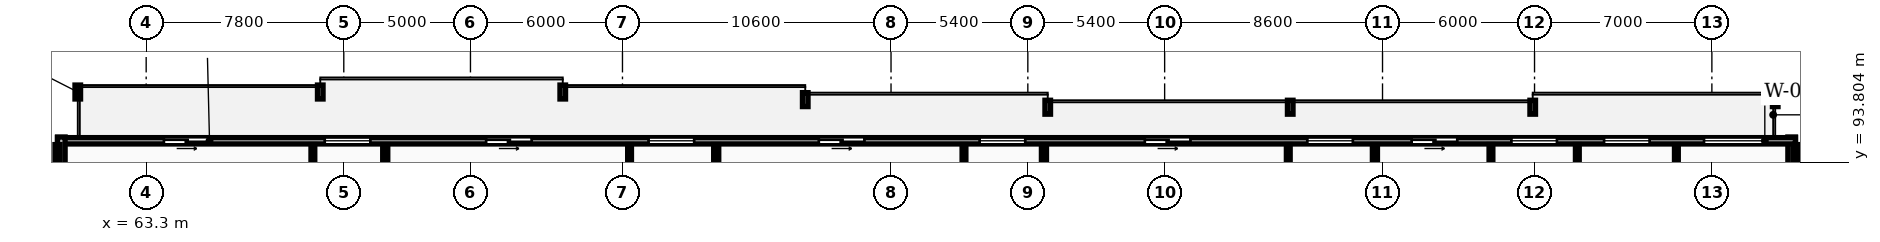
"""IFC4 building model, lengths in metres.
Left out: names, types, materials, properties, quantities, classifications, styles, units other than length and angle.
Written with IfcOpenShell. Run it as: python <this file> out.ifc"""

import sys

from ifc_helpers import new_model, si_unit, direction, frame, frame_2d, origin, place, context, subcontext, project, spatial, rectangle, extrude, element, fill, save


model = new_model("IFC4")
c1 = context("Model", 3, precision=1e-05, world=origin(), true_north=direction((0.0, 1.0)))
c2 = subcontext(c1, "Body", "Model", "MODEL_VIEW")
j1 = project(units=[si_unit("LENGTHUNIT", "METRE"), si_unit("PLANEANGLEUNIT", "RADIAN")], contexts=[c1])
p1 = place(None, origin())
s1 = spatial("IfcSite", under=j1, at=p1, CompositionType="ELEMENT")
p2 = place(p1, origin())
s2 = spatial("IfcBuilding", under=s1, at=p2, CompositionType="ELEMENT")
p3 = place(p2, frame((0.0, 0.0, 210.85)))
s3 = spatial("IfcBuildingStorey", under=s2, at=p3, CompositionType="ELEMENT", Elevation=210.85)
p4 = place(p3, frame((128.25, 91.2, 0.0), z_axis=(0.0, 0.0, 1.0), x_axis=(0.0, 1.0, 0.0)))
e1 = element("IfcWall", 1, at=p4, inside=s3, PredefinedType="STANDARD", context=c2, shape_type="SweptSolid", body=[
    extrude(rectangle(XDim=3.6, YDim=0.3, at=frame_2d((1.8, 0.0))), origin(), (0.0, 0.0, 1.0), 2.97),
])
p5 = place(p3, frame((128.4, 94.65, 0.0), z_axis=(0.0, 0.0, 1.0), x_axis=(-1.0, 0.0, 0.0)))
e2 = element("IfcWall", 2, at=p5, inside=s3, PredefinedType="STANDARD", context=c2, shape_type="SweptSolid", body=[
    extrude(rectangle(XDim=68.6, YDim=0.25, at=frame_2d((34.3, 0.0))), origin(), (0.0, 0.0, 1.0), 2.97),
])
p6 = place(p5, frame((62.6, 0.0, 0.0)))
e3 = element("IfcOpeningElement", 3, at=p6, cuts=e2, PredefinedType="OPENING", context=c2, shape_type="SweptSolid", body=[
    extrude(rectangle(XDim=1.8, YDim=2.2, at=frame_2d((0.9, 1.1))), frame((0.0, 0.135, 0.0), z_axis=(0.0, -1.0, 0.0), x_axis=(1.0, 0.0, 0.0)), (0.0, 0.0, 1.0), 0.27),
])
p7 = place(p5, frame((56.252, 0.0, 0.85)))
e4 = element("IfcOpeningElement", 4, at=p7, cuts=e2, PredefinedType="OPENING", context=c2, shape_type="SweptSolid", body=[
    extrude(rectangle(XDim=1.8, YDim=1.8, at=frame_2d((0.9, 0.9))), frame((0.0, 0.135, 0.0), z_axis=(0.0, -1.0, 0.0), x_axis=(1.0, 0.0, 0.0)), (0.0, 0.0, 1.0), 0.27),
])
p8 = place(p5, frame((49.882, 0.0, 0.0)))
e5 = element("IfcOpeningElement", 5, at=p8, cuts=e2, PredefinedType="OPENING", context=c2, shape_type="SweptSolid", body=[
    extrude(rectangle(XDim=1.8, YDim=2.2, at=frame_2d((0.9, 1.1))), frame((0.0, 0.135, 0.0), z_axis=(0.0, -1.0, 0.0), x_axis=(1.0, 0.0, 0.0)), (0.0, 0.0, 1.0), 0.27),
])
p9 = place(p5, frame((43.47, 0.0, 0.85)))
e6 = element("IfcOpeningElement", 6, at=p9, cuts=e2, PredefinedType="OPENING", context=c2, shape_type="SweptSolid", body=[
    extrude(rectangle(XDim=1.8, YDim=1.8, at=frame_2d((0.9, 0.9))), frame((0.0, 0.135, 0.0), z_axis=(0.0, -1.0, 0.0), x_axis=(1.0, 0.0, 0.0)), (0.0, 0.0, 1.0), 0.27),
])
p10 = place(p5, frame((36.75, 0.0, 0.0)))
e7 = element("IfcOpeningElement", 7, at=p10, cuts=e2, PredefinedType="OPENING", context=c2, shape_type="SweptSolid", body=[
    extrude(rectangle(XDim=1.8, YDim=2.2, at=frame_2d((0.9, 1.1))), frame((0.0, 0.135, 0.0), z_axis=(0.0, -1.0, 0.0), x_axis=(1.0, 0.0, 0.0)), (0.0, 0.0, 1.0), 0.27),
])
p11 = place(p5, frame((30.402, 0.0, 0.85)))
e8 = element("IfcOpeningElement", 8, at=p11, cuts=e2, PredefinedType="OPENING", context=c2, shape_type="SweptSolid", body=[
    extrude(rectangle(XDim=1.8, YDim=1.8, at=frame_2d((0.9, 0.9))), frame((0.0, 0.135, 0.0), z_axis=(0.0, -1.0, 0.0), x_axis=(1.0, 0.0, 0.0)), (0.0, 0.0, 1.0), 0.27),
])
p12 = place(p5, frame((23.882, 0.0, 0.0)))
e9 = element("IfcOpeningElement", 9, at=p12, cuts=e2, PredefinedType="OPENING", context=c2, shape_type="SweptSolid", body=[
    extrude(rectangle(XDim=1.8, YDim=2.2, at=frame_2d((0.9, 1.1))), frame((0.0, 0.135, 0.0), z_axis=(0.0, -1.0, 0.0), x_axis=(1.0, 0.0, 0.0)), (0.0, 0.0, 1.0), 0.27),
])
p13 = place(p5, frame((17.47, 0.0, 0.85)))
e10 = element("IfcOpeningElement", 10, at=p13, cuts=e2, PredefinedType="OPENING", context=c2, shape_type="SweptSolid", body=[
    extrude(rectangle(XDim=1.8, YDim=1.8, at=frame_2d((0.9, 0.9))), frame((0.0, 0.135, 0.0), z_axis=(0.0, -1.0, 0.0), x_axis=(1.0, 0.0, 0.0)), (0.0, 0.0, 1.0), 0.27),
])
p14 = place(p5, frame((9.415, 0.0, 0.85)))
e11 = element("IfcOpeningElement", 11, at=p14, cuts=e2, PredefinedType="OPENING", context=c2, shape_type="SweptSolid", body=[
    extrude(rectangle(XDim=1.8, YDim=1.8, at=frame_2d((0.9, 0.9))), frame((0.0, 0.135, 0.0), z_axis=(0.0, -1.0, 0.0), x_axis=(1.0, 0.0, 0.0)), (0.0, 0.0, 1.0), 0.27),
])
p15 = place(p5, frame((5.756, 0.0, 0.85)))
e12 = element("IfcOpeningElement", 12, at=p15, cuts=e2, PredefinedType="OPENING", context=c2, shape_type="SweptSolid", body=[
    extrude(rectangle(XDim=1.8, YDim=1.8, at=frame_2d((0.9, 0.9))), frame((0.0, 0.135, 0.0), z_axis=(0.0, -1.0, 0.0), x_axis=(1.0, 0.0, 0.0)), (0.0, 0.0, 1.0), 0.27),
])
p16 = place(p5, frame((13.35, 0.0, 0.0)))
e13 = element("IfcOpeningElement", 13, at=p16, cuts=e2, PredefinedType="OPENING", context=c2, shape_type="SweptSolid", body=[
    extrude(rectangle(XDim=1.8, YDim=2.2, at=frame_2d((0.9, 1.1))), frame((0.0, 0.135, 0.0), z_axis=(0.0, -1.0, 0.0), x_axis=(1.0, 0.0, 0.0)), (0.0, 0.0, 1.0), 0.27),
])
p17 = place(p5, frame((1.21, 0.0, 0.85)))
e14 = element("IfcOpeningElement", 14, at=p17, cuts=e2, PredefinedType="OPENING", context=c2, shape_type="SweptSolid", body=[
    extrude(rectangle(XDim=2.4, YDim=1.9, at=frame_2d((1.2, 0.95))), frame((0.0, 0.135, 0.0), z_axis=(0.0, -1.0, 0.0), x_axis=(1.0, 0.0, 0.0)), (0.0, 0.0, 1.0), 0.27),
])
p18 = place(p3, frame((59.95, 94.8, 0.0), z_axis=(0.0, 0.0, 1.0), x_axis=(0.0, -1.0, 0.0)))
e15 = element("IfcWall", 15, at=p18, inside=s3, PredefinedType="STANDARD", context=c2, shape_type="SweptSolid", body=[
    extrude(rectangle(XDim=3.6, YDim=0.3, at=frame_2d((1.8, 0.0))), origin(), (0.0, 0.0, 1.0), 2.97),
])
for number, where, z_axis, x_axis in (
    (16, (59.8, 70.18, 0.0), (0.0, 0.0, 1.0), (0.0, 1.0, 0.0)),
    (17, (128.4, 70.18, 0.0), (0.0, 0.0, 1.0), (0.0, 1.0, 0.0)),
):
    element("IfcWall", number, at=place(p3, frame(where, z_axis=z_axis, x_axis=x_axis)), inside=s3, PredefinedType="PARTITIONING", context=c2, shape_type="SweptSolid", body=[
        extrude(rectangle(XDim=24.32, YDim=0.2, at=frame_2d((12.16, 0.0))), origin(), (0.0, 0.0, 1.0), 2.277),
    ])
p19 = place(p3, frame((72.736, 70.18, 0.0), z_axis=(0.0, 0.0, 1.0), x_axis=(0.0, 1.0, 0.0)))
e18 = element("IfcWall", 18, at=p19, inside=s3, PredefinedType="PARTITIONING", context=c2, shape_type="SweptSolid", body=[
    extrude(rectangle(XDim=24.32, YDim=0.2, at=frame_2d((12.16, 0.0))), origin(), (0.0, 0.0, 1.0), 2.97),
])
p20 = place(p3, frame((69.88, 84.54, 0.0), z_axis=(0.0, 0.0, 1.0), x_axis=(0.0, 1.0, 0.0)))
e19 = element("IfcWall", 19, at=p20, inside=s3, PredefinedType="PARTITIONING", context=c2, shape_type="SweptSolid", body=[
    extrude(rectangle(XDim=9.96, YDim=0.15, at=frame_2d((4.98, 0.0))), origin(), (0.0, 0.0, 1.0), 2.97),
])
p21 = place(p20, frame((1.43, 0.0, 0.0)))
e20 = element("IfcOpeningElement", 20, at=p21, cuts=e19, PredefinedType="OPENING", context=c2, shape_type="SweptSolid", body=[
    extrude(rectangle(XDim=0.84, YDim=2.04, at=frame_2d((0.42, 1.02))), frame((0.0, 0.085, 0.0), z_axis=(0.0, -1.0, 0.0), x_axis=(1.0, 0.0, 0.0)), (0.0, 0.0, 1.0), 0.17),
])
p22 = place(p20, frame((3.92, 0.0, 0.0)))
e21 = element("IfcOpeningElement", 21, at=p22, cuts=e19, PredefinedType="OPENING", context=c2, shape_type="SweptSolid", body=[
    extrude(rectangle(XDim=0.84, YDim=2.04, at=frame_2d((0.42, 1.02))), frame((0.0, 0.085, 0.0), z_axis=(0.0, -1.0, 0.0), x_axis=(1.0, 0.0, 0.0)), (0.0, 0.0, 1.0), 0.17),
])
p23 = place(p20, frame((8.297, 0.0, 0.0)))
e22 = element("IfcOpeningElement", 22, at=p23, cuts=e19, PredefinedType="OPENING", context=c2, shape_type="SweptSolid", body=[
    extrude(rectangle(XDim=0.88, YDim=2.06, at=frame_2d((0.44, 1.03))), frame((0.0, 0.085, 0.0), z_axis=(0.0, -1.0, 0.0), x_axis=(1.0, 0.0, 0.0)), (0.0, 0.0, 1.0), 0.17),
])
p24 = place(p3, frame((85.8, 70.18, 0.0), z_axis=(0.0, 0.0, 1.0), x_axis=(0.0, 1.0, 0.0)))
e23 = element("IfcWall", 23, at=p24, inside=s3, PredefinedType="PARTITIONING", context=c2, shape_type="SweptSolid", body=[
    extrude(rectangle(XDim=24.32, YDim=0.2, at=frame_2d((12.16, 0.0))), origin(), (0.0, 0.0, 1.0), 2.97),
])
p25 = place(p3, frame((82.38, 84.54, 0.0), z_axis=(0.0, 0.0, 1.0), x_axis=(0.0, 1.0, 0.0)))
e24 = element("IfcWall", 24, at=p25, inside=s3, PredefinedType="PARTITIONING", context=c2, shape_type="SweptSolid", body=[
    extrude(rectangle(XDim=9.96, YDim=0.15, at=frame_2d((4.98, 0.0))), origin(), (0.0, 0.0, 1.0), 2.97),
])
p26 = place(p25, frame((1.43, 0.0, 0.0)))
e25 = element("IfcOpeningElement", 25, at=p26, cuts=e24, PredefinedType="OPENING", context=c2, shape_type="SweptSolid", body=[
    extrude(rectangle(XDim=0.84, YDim=2.04, at=frame_2d((0.42, 1.02))), frame((0.0, 0.085, 0.0), z_axis=(0.0, -1.0, 0.0), x_axis=(1.0, 0.0, 0.0)), (0.0, 0.0, 1.0), 0.17),
])
p27 = place(p25, frame((3.92, 0.0, 0.0)))
e26 = element("IfcOpeningElement", 26, at=p27, cuts=e24, PredefinedType="OPENING", context=c2, shape_type="SweptSolid", body=[
    extrude(rectangle(XDim=0.84, YDim=2.04, at=frame_2d((0.42, 1.02))), frame((0.0, 0.085, 0.0), z_axis=(0.0, -1.0, 0.0), x_axis=(1.0, 0.0, 0.0)), (0.0, 0.0, 1.0), 0.17),
])
p28 = place(p25, frame((8.297, 0.0, 0.0)))
e27 = element("IfcOpeningElement", 27, at=p28, cuts=e24, PredefinedType="OPENING", context=c2, shape_type="SweptSolid", body=[
    extrude(rectangle(XDim=0.88, YDim=2.06, at=frame_2d((0.44, 1.03))), frame((0.0, 0.085, 0.0), z_axis=(0.0, -1.0, 0.0), x_axis=(1.0, 0.0, 0.0)), (0.0, 0.0, 1.0), 0.17),
])
p29 = place(p3, frame((98.736, 70.18, 0.0), z_axis=(0.0, 0.0, 1.0), x_axis=(0.0, 1.0, 0.0)))
e28 = element("IfcWall", 28, at=p29, inside=s3, PredefinedType="PARTITIONING", context=c2, shape_type="SweptSolid", body=[
    extrude(rectangle(XDim=24.32, YDim=0.2, at=frame_2d((12.16, 0.0))), origin(), (0.0, 0.0, 1.0), 2.97),
])
p30 = place(p3, frame((95.58, 84.54, 0.0), z_axis=(0.0, 0.0, 1.0), x_axis=(0.0, 1.0, 0.0)))
e29 = element("IfcWall", 29, at=p30, inside=s3, PredefinedType="PARTITIONING", context=c2, shape_type="SweptSolid", body=[
    extrude(rectangle(XDim=9.96, YDim=0.15, at=frame_2d((4.98, 0.0))), origin(), (0.0, 0.0, 1.0), 2.97),
])
p31 = place(p30, frame((1.43, 0.0, 0.0)))
e30 = element("IfcOpeningElement", 30, at=p31, cuts=e29, PredefinedType="OPENING", context=c2, shape_type="SweptSolid", body=[
    extrude(rectangle(XDim=0.84, YDim=2.04, at=frame_2d((0.42, 1.02))), frame((0.0, 0.085, 0.0), z_axis=(0.0, -1.0, 0.0), x_axis=(1.0, 0.0, 0.0)), (0.0, 0.0, 1.0), 0.17),
])
p32 = place(p30, frame((3.92, 0.0, 0.0)))
e31 = element("IfcOpeningElement", 31, at=p32, cuts=e29, PredefinedType="OPENING", context=c2, shape_type="SweptSolid", body=[
    extrude(rectangle(XDim=0.84, YDim=2.04, at=frame_2d((0.42, 1.02))), frame((0.0, 0.085, 0.0), z_axis=(0.0, -1.0, 0.0), x_axis=(1.0, 0.0, 0.0)), (0.0, 0.0, 1.0), 0.17),
])
p33 = place(p30, frame((8.297, 0.0, 0.0)))
e32 = element("IfcOpeningElement", 32, at=p33, cuts=e29, PredefinedType="OPENING", context=c2, shape_type="SweptSolid", body=[
    extrude(rectangle(XDim=0.88, YDim=2.06, at=frame_2d((0.44, 1.03))), frame((0.0, 0.085, 0.0), z_axis=(0.0, -1.0, 0.0), x_axis=(1.0, 0.0, 0.0)), (0.0, 0.0, 1.0), 0.17),
])
p34 = place(p3, frame((111.8, 70.18, 0.0), z_axis=(0.0, 0.0, 1.0), x_axis=(0.0, 1.0, 0.0)))
e33 = element("IfcWall", 33, at=p34, inside=s3, PredefinedType="PARTITIONING", context=c2, shape_type="SweptSolid", body=[
    extrude(rectangle(XDim=24.32, YDim=0.2, at=frame_2d((12.16, 0.0))), origin(), (0.0, 0.0, 1.0), 2.97),
])
p35 = place(p3, frame((108.38, 84.54, 0.0), z_axis=(0.0, 0.0, 1.0), x_axis=(0.0, 1.0, 0.0)))
e34 = element("IfcWall", 34, at=p35, inside=s3, PredefinedType="PARTITIONING", context=c2, shape_type="SweptSolid", body=[
    extrude(rectangle(XDim=9.96, YDim=0.15, at=frame_2d((4.98, 0.0))), origin(), (0.0, 0.0, 1.0), 2.97),
])
p36 = place(p35, frame((1.43, 0.0, 0.0)))
e35 = element("IfcOpeningElement", 35, at=p36, cuts=e34, PredefinedType="OPENING", context=c2, shape_type="SweptSolid", body=[
    extrude(rectangle(XDim=0.84, YDim=2.04, at=frame_2d((0.42, 1.02))), frame((0.0, 0.085, 0.0), z_axis=(0.0, -1.0, 0.0), x_axis=(1.0, 0.0, 0.0)), (0.0, 0.0, 1.0), 0.17),
])
p37 = place(p35, frame((3.92, 0.0, 0.0)))
e36 = element("IfcOpeningElement", 36, at=p37, cuts=e34, PredefinedType="OPENING", context=c2, shape_type="SweptSolid", body=[
    extrude(rectangle(XDim=0.84, YDim=2.04, at=frame_2d((0.42, 1.02))), frame((0.0, 0.085, 0.0), z_axis=(0.0, -1.0, 0.0), x_axis=(1.0, 0.0, 0.0)), (0.0, 0.0, 1.0), 0.17),
])
p38 = place(p35, frame((5.48, 0.0, 0.0)))
e37 = element("IfcOpeningElement", 37, at=p38, cuts=e34, PredefinedType="OPENING", context=c2, shape_type="SweptSolid", body=[
    extrude(rectangle(XDim=0.88, YDim=2.06, at=frame_2d((0.44, 1.03))), frame((0.0, 0.085, 0.0), z_axis=(0.0, -1.0, 0.0), x_axis=(1.0, 0.0, 0.0)), (0.0, 0.0, 1.0), 0.17),
])
p39 = place(p3, frame((119.79, 89.68, 0.0), z_axis=(0.0, 0.0, 1.0), x_axis=(0.0, 1.0, 0.0)))
e38 = element("IfcWall", 38, at=p39, inside=s3, PredefinedType="PARTITIONING", context=c2, shape_type="SweptSolid", body=[
    extrude(rectangle(XDim=4.82, YDim=0.15, at=frame_2d((2.41, 0.0))), origin(), (0.0, 0.0, 1.0), 2.97),
])
p40 = place(p3, frame((116.38, 84.54, 0.0), z_axis=(0.0, 0.0, 1.0), x_axis=(0.0, 1.0, 0.0)))
e39 = element("IfcWall", 39, at=p40, inside=s3, PredefinedType="PARTITIONING", context=c2, shape_type="SweptSolid", body=[
    extrude(rectangle(XDim=9.96, YDim=0.15, at=frame_2d((4.98, 0.0))), origin(), (0.0, 0.0, 1.0), 2.97),
])
p41 = place(p40, frame((3.82, 0.0, 0.0)))
e40 = element("IfcOpeningElement", 40, at=p41, cuts=e39, PredefinedType="OPENING", context=c2, shape_type="SweptSolid", body=[
    extrude(rectangle(XDim=0.92, YDim=2.08, at=frame_2d((0.46, 1.04))), frame((0.0, 0.085, 0.0), z_axis=(0.0, -1.0, 0.0), x_axis=(1.0, 0.0, 0.0)), (0.0, 0.0, 1.0), 0.17),
])
p42 = place(p3, frame((123.699, 87.05, 0.0), z_axis=(0.0, 0.0, 1.0), x_axis=(0.0, 1.0, 0.0)))
e41 = element("IfcWall", 41, at=p42, inside=s3, PredefinedType="PARTITIONING", context=c2, shape_type="SweptSolid", body=[
    extrude(rectangle(XDim=7.45, YDim=0.15, at=frame_2d((3.725, 0.0))), origin(), (0.0, 0.0, 1.0), 2.97),
])
p43 = place(p42, frame((1.31, 0.0, 0.0)))
e42 = element("IfcOpeningElement", 42, at=p43, cuts=e41, PredefinedType="OPENING", context=c2, shape_type="SweptSolid", body=[
    extrude(rectangle(XDim=0.92, YDim=2.08, at=frame_2d((0.46, 1.04))), frame((0.0, 0.085, 0.0), z_axis=(0.0, -1.0, 0.0), x_axis=(1.0, 0.0, 0.0)), (0.0, 0.0, 1.0), 0.17),
])
p44 = place(p6, origin())
e43 = element("IfcDoor", 43, at=p44, inside=s3, OperationType="SLIDING_TO_LEFT", PredefinedType="DOOR", context=c2, shape_type="SweptSolid", body=[
    extrude(rectangle(XDim=1.8, YDim=2.2, at=frame_2d((0.9, 1.1))), frame((0.0, 0.025, 0.0), z_axis=(0.0, -1.0, 0.0), x_axis=(1.0, 0.0, 0.0)), (0.0, 0.0, 1.0), 0.05),
])
fill(e3, e43)
p45 = place(p7, origin())
e44 = element("IfcWindow", 44, at=p45, inside=s3, PartitioningType="SINGLE_PANEL", PredefinedType="WINDOW", context=c2, shape_type="SweptSolid", body=[
    extrude(rectangle(XDim=1.8, YDim=1.8, at=frame_2d((0.9, 0.9))), frame((0.0, 0.03, 0.0), z_axis=(0.0, -1.0, 0.0), x_axis=(1.0, 0.0, 0.0)), (0.0, 0.0, 1.0), 0.06),
])
fill(e4, e44)
p46 = place(p8, origin())
e45 = element("IfcDoor", 45, at=p46, inside=s3, OperationType="SLIDING_TO_LEFT", PredefinedType="DOOR", context=c2, shape_type="SweptSolid", body=[
    extrude(rectangle(XDim=1.8, YDim=2.2, at=frame_2d((0.9, 1.1))), frame((0.0, 0.025, 0.0), z_axis=(0.0, -1.0, 0.0), x_axis=(1.0, 0.0, 0.0)), (0.0, 0.0, 1.0), 0.05),
])
fill(e5, e45)
p47 = place(p9, origin())
e46 = element("IfcWindow", 46, at=p47, inside=s3, PartitioningType="SINGLE_PANEL", PredefinedType="WINDOW", context=c2, shape_type="SweptSolid", body=[
    extrude(rectangle(XDim=1.8, YDim=1.8, at=frame_2d((0.9, 0.9))), frame((0.0, 0.03, 0.0), z_axis=(0.0, -1.0, 0.0), x_axis=(1.0, 0.0, 0.0)), (0.0, 0.0, 1.0), 0.06),
])
fill(e6, e46)
p48 = place(p10, origin())
e47 = element("IfcDoor", 47, at=p48, inside=s3, OperationType="SLIDING_TO_LEFT", PredefinedType="DOOR", context=c2, shape_type="SweptSolid", body=[
    extrude(rectangle(XDim=1.8, YDim=2.2, at=frame_2d((0.9, 1.1))), frame((0.0, 0.025, 0.0), z_axis=(0.0, -1.0, 0.0), x_axis=(1.0, 0.0, 0.0)), (0.0, 0.0, 1.0), 0.05),
])
fill(e7, e47)
p49 = place(p11, origin())
e48 = element("IfcWindow", 48, at=p49, inside=s3, PartitioningType="SINGLE_PANEL", PredefinedType="WINDOW", context=c2, shape_type="SweptSolid", body=[
    extrude(rectangle(XDim=1.8, YDim=1.8, at=frame_2d((0.9, 0.9))), frame((0.0, 0.03, 0.0), z_axis=(0.0, -1.0, 0.0), x_axis=(1.0, 0.0, 0.0)), (0.0, 0.0, 1.0), 0.06),
])
fill(e8, e48)
p50 = place(p12, origin())
e49 = element("IfcDoor", 49, at=p50, inside=s3, OperationType="SLIDING_TO_LEFT", PredefinedType="DOOR", context=c2, shape_type="SweptSolid", body=[
    extrude(rectangle(XDim=1.8, YDim=2.2, at=frame_2d((0.9, 1.1))), frame((0.0, 0.025, 0.0), z_axis=(0.0, -1.0, 0.0), x_axis=(1.0, 0.0, 0.0)), (0.0, 0.0, 1.0), 0.05),
])
fill(e9, e49)
p51 = place(p13, origin())
e50 = element("IfcWindow", 50, at=p51, inside=s3, PartitioningType="SINGLE_PANEL", PredefinedType="WINDOW", context=c2, shape_type="SweptSolid", body=[
    extrude(rectangle(XDim=1.8, YDim=1.8, at=frame_2d((0.9, 0.9))), frame((0.0, 0.03, 0.0), z_axis=(0.0, -1.0, 0.0), x_axis=(1.0, 0.0, 0.0)), (0.0, 0.0, 1.0), 0.06),
])
fill(e10, e50)
p52 = place(p14, origin())
e51 = element("IfcWindow", 51, at=p52, inside=s3, PartitioningType="SINGLE_PANEL", PredefinedType="WINDOW", context=c2, shape_type="SweptSolid", body=[
    extrude(rectangle(XDim=1.8, YDim=1.8, at=frame_2d((0.9, 0.9))), frame((0.0, 0.03, 0.0), z_axis=(0.0, -1.0, 0.0), x_axis=(1.0, 0.0, 0.0)), (0.0, 0.0, 1.0), 0.06),
])
fill(e11, e51)
p53 = place(p15, origin())
e52 = element("IfcWindow", 52, at=p53, inside=s3, PartitioningType="SINGLE_PANEL", PredefinedType="WINDOW", context=c2, shape_type="SweptSolid", body=[
    extrude(rectangle(XDim=1.8, YDim=1.8, at=frame_2d((0.9, 0.9))), frame((0.0, 0.03, 0.0), z_axis=(0.0, -1.0, 0.0), x_axis=(1.0, 0.0, 0.0)), (0.0, 0.0, 1.0), 0.06),
])
fill(e12, e52)
p54 = place(p16, origin())
e53 = element("IfcDoor", 53, at=p54, inside=s3, OperationType="SLIDING_TO_LEFT", PredefinedType="DOOR", context=c2, shape_type="SweptSolid", body=[
    extrude(rectangle(XDim=1.8, YDim=2.2, at=frame_2d((0.9, 1.1))), frame((0.0, 0.025, 0.0), z_axis=(0.0, -1.0, 0.0), x_axis=(1.0, 0.0, 0.0)), (0.0, 0.0, 1.0), 0.05),
])
fill(e13, e53)
p55 = place(p17, origin())
e54 = element("IfcWindow", 54, at=p55, inside=s3, PartitioningType="DOUBLE_PANEL_VERTICAL", PredefinedType="WINDOW", context=c2, shape_type="SweptSolid", body=[
    extrude(rectangle(XDim=2.4, YDim=1.9, at=frame_2d((1.2, 0.95))), frame((0.0, 0.03, 0.0), z_axis=(0.0, -1.0, 0.0), x_axis=(1.0, 0.0, 0.0)), (0.0, 0.0, 1.0), 0.06),
])
fill(e14, e54)
save(model, sys.argv[1])
